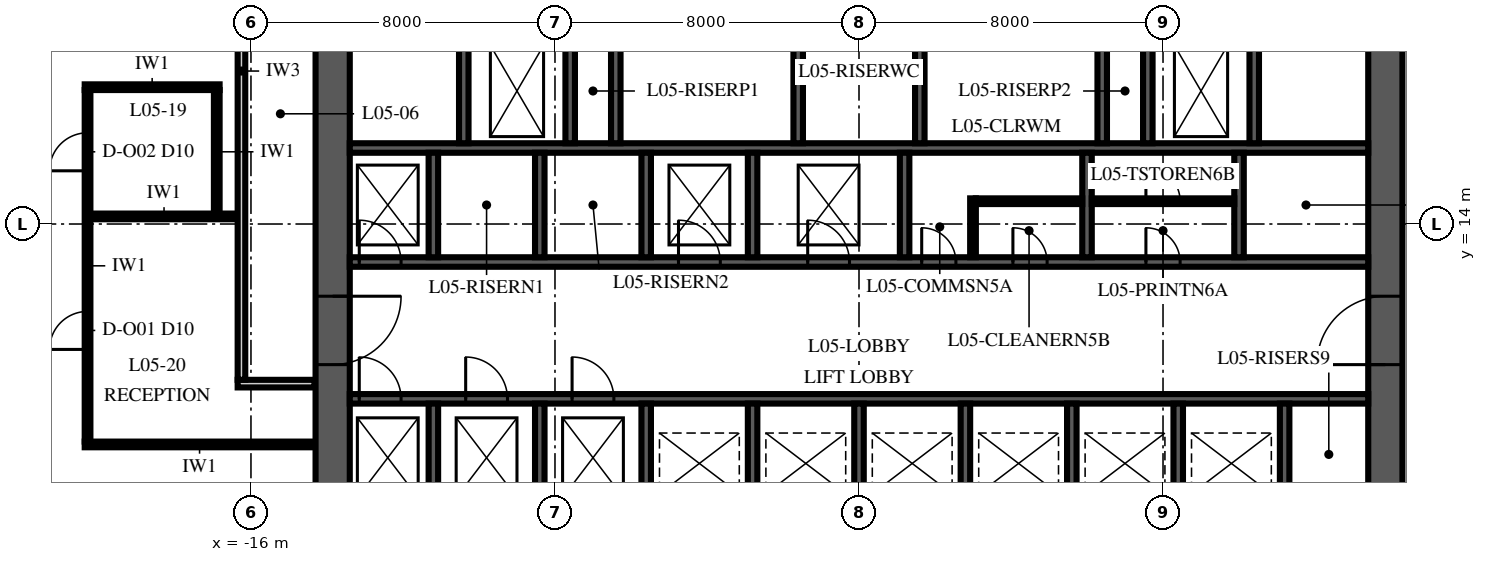
"""IFC4 building model, lengths in metres.
Left out: names, types, materials, properties, quantities, classifications, styles, units other than length and angle.
Written with IfcOpenShell. Run it as: python <this file> out.ifc"""

import sys

from ifc_helpers import new_model, si_unit, direction, frame, frame_2d, origin, place, context, subcontext, project, spatial, polyline, rectangle, outline, extrude, element, fill, save


model = new_model("IFC4")
c1 = context("Model", 3, precision=1e-05, world=origin(), true_north=direction((0.0, 1.0)))
c2 = subcontext(c1, "Body", "Model", "MODEL_VIEW")
j1 = project(units=[si_unit("LENGTHUNIT", "METRE"), si_unit("PLANEANGLEUNIT", "RADIAN")], contexts=[c1])
p1 = place(None, origin())
s1 = spatial("IfcSite", under=j1, at=p1, CompositionType="ELEMENT")
p2 = place(p1, origin())
s2 = spatial("IfcBuilding", under=s1, at=p2, CompositionType="ELEMENT")
p3 = place(p2, frame((0.0, 0.0, 32.0)))
s3 = spatial("IfcBuildingStorey", under=s2, at=p3, CompositionType="ELEMENT", Elevation=32.0)
p4 = place(p3, frame((13.85, 6.15, 0.0), z_axis=(0.0, 0.0, 1.0), x_axis=(0.0, 1.0, 0.0)))
e1 = element("IfcWall", 1, at=p4, inside=s3, PredefinedType="SHEAR", context=c2, shape_type="SweptSolid", body=[
    extrude(outline(polyline([(0.0, -0.45), (17.7, -0.45), (17.7, 0.0), (17.25, 0.0), (17.25, 0.45), (0.45, 0.45), (0.45, 0.0), (0.0, 0.0), (0.0, -0.45)])), origin(), (0.0, 0.0, 1.0), 4.0),
])
p5 = place(p4, frame((4.15, 0.0, 0.0)))
e2 = element("IfcOpeningElement", 2, at=p5, cuts=e1, PredefinedType="OPENING", context=c2, shape_type="SweptSolid", body=[
    extrude(rectangle(XDim=1.8, YDim=2.4, at=frame_2d((0.9, 1.2))), frame((0.0, 0.465, 0.0), z_axis=(0.0, -1.0, 0.0), x_axis=(1.0, 0.0, 0.0)), (0.0, 0.0, 1.0), 0.93),
])
p6 = place(p3, frame((-13.85, 23.85, 0.0), z_axis=(0.0, 0.0, 1.0), x_axis=(0.0, -1.0, 0.0)))
e3 = element("IfcWall", 3, at=p6, inside=s3, PredefinedType="SHEAR", context=c2, shape_type="SweptSolid", body=[
    extrude(outline(polyline([(0.0, -0.45), (17.7, -0.45), (17.7, 0.0), (17.25, 0.0), (17.25, 0.45), (0.45, 0.45), (0.45, 0.0), (0.0, 0.0), (0.0, -0.45)])), origin(), (0.0, 0.0, 1.0), 4.0),
])
p7 = place(p6, frame((11.75, 0.0, 0.0)))
e4 = element("IfcOpeningElement", 4, at=p7, cuts=e3, PredefinedType="OPENING", context=c2, shape_type="SweptSolid", body=[
    extrude(rectangle(XDim=1.8, YDim=2.4, at=frame_2d((0.9, 1.2))), frame((0.0, 0.465, 0.0), z_axis=(0.0, -1.0, 0.0), x_axis=(1.0, 0.0, 0.0)), (0.0, 0.0, 1.0), 0.93),
])
p8 = place(p3, frame((-13.4, 9.4, 0.0), z_axis=(0.0, 0.0, 1.0), x_axis=(1.0, 0.0, 0.0)))
e5 = element("IfcWall", 5, at=p8, inside=s3, PredefinedType="SHEAR", context=c2, shape_type="SweptSolid", body=[
    extrude(rectangle(XDim=26.8, YDim=0.25, at=frame_2d((13.4, 0.0))), origin(), (0.0, 0.0, 1.0), 4.0),
])
p9 = place(p8, frame((0.25, 0.0, 0.0)))
e6 = element("IfcOpeningElement", 6, at=p9, cuts=e5, PredefinedType="OPENING", context=c2, shape_type="SweptSolid", body=[
    extrude(rectangle(XDim=1.1, YDim=2.1, at=frame_2d((0.55, 1.05))), frame((0.0, 0.14, 0.0), z_axis=(0.0, -1.0, 0.0), x_axis=(1.0, 0.0, 0.0)), (0.0, 0.0, 1.0), 0.28),
])
p10 = place(p8, frame((3.05, 0.0, 0.0)))
e7 = element("IfcOpeningElement", 7, at=p10, cuts=e5, PredefinedType="OPENING", context=c2, shape_type="SweptSolid", body=[
    extrude(rectangle(XDim=1.1, YDim=2.1, at=frame_2d((0.55, 1.05))), frame((0.0, 0.14, 0.0), z_axis=(0.0, -1.0, 0.0), x_axis=(1.0, 0.0, 0.0)), (0.0, 0.0, 1.0), 0.28),
])
p11 = place(p8, frame((5.85, 0.0, 0.0)))
e8 = element("IfcOpeningElement", 8, at=p11, cuts=e5, PredefinedType="OPENING", context=c2, shape_type="SweptSolid", body=[
    extrude(rectangle(XDim=1.1, YDim=2.1, at=frame_2d((0.55, 1.05))), frame((0.0, 0.14, 0.0), z_axis=(0.0, -1.0, 0.0), x_axis=(1.0, 0.0, 0.0)), (0.0, 0.0, 1.0), 0.28),
])
p12 = place(p3, frame((-13.4, 13.0, 0.0), z_axis=(0.0, 0.0, 1.0), x_axis=(1.0, 0.0, 0.0)))
e9 = element("IfcWall", 9, at=p12, inside=s3, PredefinedType="SHEAR", context=c2, shape_type="SweptSolid", body=[
    extrude(rectangle(XDim=26.8, YDim=0.25, at=frame_2d((13.4, 0.0))), origin(), (0.0, 0.0, 1.0), 4.0),
])
p13 = place(p12, frame((0.25, 0.0, 0.0)))
e10 = element("IfcOpeningElement", 10, at=p13, cuts=e9, PredefinedType="OPENING", context=c2, shape_type="SweptSolid", body=[
    extrude(rectangle(XDim=1.1, YDim=2.1, at=frame_2d((0.55, 1.05))), frame((0.0, 0.14, 0.0), z_axis=(0.0, -1.0, 0.0), x_axis=(1.0, 0.0, 0.0)), (0.0, 0.0, 1.0), 0.28),
])
p14 = place(p12, frame((8.65, 0.0, 0.0)))
e11 = element("IfcOpeningElement", 11, at=p14, cuts=e9, PredefinedType="OPENING", context=c2, shape_type="SweptSolid", body=[
    extrude(rectangle(XDim=1.1, YDim=2.1, at=frame_2d((0.55, 1.05))), frame((0.0, 0.14, 0.0), z_axis=(0.0, -1.0, 0.0), x_axis=(1.0, 0.0, 0.0)), (0.0, 0.0, 1.0), 0.28),
])
p15 = place(p12, frame((12.05, 0.0, 0.0)))
e12 = element("IfcOpeningElement", 12, at=p15, cuts=e9, PredefinedType="OPENING", context=c2, shape_type="SweptSolid", body=[
    extrude(rectangle(XDim=1.1, YDim=2.1, at=frame_2d((0.55, 1.05))), frame((0.0, 0.14, 0.0), z_axis=(0.0, -1.0, 0.0), x_axis=(1.0, 0.0, 0.0)), (0.0, 0.0, 1.0), 0.28),
])
p16 = place(p12, frame((15.05, 0.0, 0.0)))
e13 = element("IfcOpeningElement", 13, at=p16, cuts=e9, PredefinedType="OPENING", context=c2, shape_type="SweptSolid", body=[
    extrude(rectangle(XDim=0.9, YDim=2.1, at=frame_2d((0.45, 1.05))), frame((0.0, 0.14, 0.0), z_axis=(0.0, -1.0, 0.0), x_axis=(1.0, 0.0, 0.0)), (0.0, 0.0, 1.0), 0.28),
])
p17 = place(p12, frame((17.45, 0.0, 0.0)))
e14 = element("IfcOpeningElement", 14, at=p17, cuts=e9, PredefinedType="OPENING", context=c2, shape_type="SweptSolid", body=[
    extrude(rectangle(XDim=0.9, YDim=2.1, at=frame_2d((0.45, 1.05))), frame((0.0, 0.14, 0.0), z_axis=(0.0, -1.0, 0.0), x_axis=(1.0, 0.0, 0.0)), (0.0, 0.0, 1.0), 0.28),
])
p18 = place(p12, frame((20.95, 0.0, 0.0)))
e15 = element("IfcOpeningElement", 15, at=p18, cuts=e9, PredefinedType="OPENING", context=c2, shape_type="SweptSolid", body=[
    extrude(rectangle(XDim=0.9, YDim=2.1, at=frame_2d((0.45, 1.05))), frame((0.0, 0.14, 0.0), z_axis=(0.0, -1.0, 0.0), x_axis=(1.0, 0.0, 0.0)), (0.0, 0.0, 1.0), 0.28),
])
p19 = place(p3, frame((-13.4, 16.0, 0.0), z_axis=(0.0, 0.0, 1.0), x_axis=(1.0, 0.0, 0.0)))
e16 = element("IfcWall", 16, at=p19, inside=s3, PredefinedType="SHEAR", context=c2, shape_type="SweptSolid", body=[
    extrude(rectangle(XDim=26.8, YDim=0.25, at=frame_2d((13.4, 0.0))), origin(), (0.0, 0.0, 1.0), 4.0),
])
for number, where, z_axis, x_axis in (
    (17, (-11.2, 6.6, 0.0), (0.0, 0.0, 1.0), (0.0, 1.0, 0.0)),
    (18, (-8.4, 6.6, 0.0), (0.0, 0.0, 1.0), (0.0, 1.0, 0.0)),
    (19, (-5.6, 6.6, 0.0), (0.0, 0.0, 1.0), (0.0, 1.0, 0.0)),
    (20, (-2.8, 6.6, 0.0), (0.0, 0.0, 1.0), (0.0, 1.0, 0.0)),
    (21, (0.0, 6.6, 0.0), (0.0, 0.0, 1.0), (0.0, 1.0, 0.0)),
    (22, (2.8, 6.6, 0.0), (0.0, 0.0, 1.0), (0.0, 1.0, 0.0)),
    (23, (5.6, 6.6, 0.0), (0.0, 0.0, 1.0), (0.0, 1.0, 0.0)),
    (24, (8.4, 6.6, 0.0), (0.0, 0.0, 1.0), (0.0, 1.0, 0.0)),
    (25, (11.2, 6.6, 0.0), (0.0, 0.0, 1.0), (0.0, 1.0, 0.0)),
):
    element("IfcWall", number, at=place(p3, frame(where, z_axis=z_axis, x_axis=x_axis)), inside=s3, PredefinedType="SHEAR", context=c2, shape_type="SweptSolid", body=[
        extrude(rectangle(XDim=2.675, YDim=0.25, at=frame_2d((1.337, 0.0))), origin(), (0.0, 0.0, 1.0), 4.0),
    ])
for number, where, z_axis, x_axis in (
    (26, (-11.2, 13.125, 0.0), (0.0, 0.0, 1.0), (0.0, 1.0, 0.0)),
    (27, (-8.4, 13.125, 0.0), (0.0, 0.0, 1.0), (0.0, 1.0, 0.0)),
    (28, (-5.6, 13.125, 0.0), (0.0, 0.0, 1.0), (0.0, 1.0, 0.0)),
    (29, (-2.8, 13.125, 0.0), (0.0, 0.0, 1.0), (0.0, 1.0, 0.0)),
    (30, (1.2, 13.125, 0.0), (0.0, 0.0, 1.0), (0.0, 1.0, 0.0)),
    (31, (6.0, 13.125, 0.0), (0.0, 0.0, 1.0), (0.0, 1.0, 0.0)),
    (32, (10.0, 13.125, 0.0), (0.0, 0.0, 1.0), (0.0, 1.0, 0.0)),
):
    element("IfcWall", number, at=place(p3, frame(where, z_axis=z_axis, x_axis=x_axis)), inside=s3, PredefinedType="SHEAR", context=c2, shape_type="SweptSolid", body=[
        extrude(rectangle(XDim=2.75, YDim=0.25, at=frame_2d((1.375, 0.0))), origin(), (0.0, 0.0, 1.0), 4.0),
    ])
p20 = place(p3, frame((-10.4, 16.125, 0.0), z_axis=(0.0, 0.0, 1.0), x_axis=(0.0, 1.0, 0.0)))
e33 = element("IfcWall", 33, at=p20, inside=s3, PredefinedType="SHEAR", context=c2, shape_type="SweptSolid", body=[
    extrude(rectangle(XDim=7.275, YDim=0.25, at=frame_2d((3.637, 0.0))), origin(), (0.0, 0.0, 1.0), 4.0),
])
p21 = place(p20, frame((6.075, 0.0, 0.0)))
e34 = element("IfcOpeningElement", 34, at=p21, cuts=e33, PredefinedType="OPENING", context=c2, shape_type="SweptSolid", body=[
    extrude(rectangle(XDim=1.0, YDim=2.1, at=frame_2d((0.5, 1.05))), frame((0.0, 0.14, 0.0), z_axis=(0.0, -1.0, 0.0), x_axis=(1.0, 0.0, 0.0)), (0.0, 0.0, 1.0), 0.28),
])
for number, where, z_axis, x_axis in (
    (35, (-6.4, 16.125, 0.0), (0.0, 0.0, 1.0), (0.0, 1.0, 0.0)),
    (36, (-1.6, 16.125, 0.0), (0.0, 0.0, 1.0), (0.0, 1.0, 0.0)),
    (37, (1.6, 16.125, 0.0), (0.0, 0.0, 1.0), (0.0, 1.0, 0.0)),
    (38, (6.4, 16.125, 0.0), (0.0, 0.0, 1.0), (0.0, 1.0, 0.0)),
):
    element("IfcWall", number, at=place(p3, frame(where, z_axis=z_axis, x_axis=x_axis)), inside=s3, PredefinedType="SHEAR", context=c2, shape_type="SweptSolid", body=[
        extrude(rectangle(XDim=7.275, YDim=0.25, at=frame_2d((3.637, 0.0))), origin(), (0.0, 0.0, 1.0), 4.0),
    ])
p22 = place(p3, frame((10.4, 16.125, 0.0), z_axis=(0.0, 0.0, 1.0), x_axis=(0.0, 1.0, 0.0)))
e39 = element("IfcWall", 39, at=p22, inside=s3, PredefinedType="SHEAR", context=c2, shape_type="SweptSolid", body=[
    extrude(rectangle(XDim=7.275, YDim=0.25, at=frame_2d((3.637, 0.0))), origin(), (0.0, 0.0, 1.0), 4.0),
])
p23 = place(p22, frame((6.075, 0.0, 0.0)))
e40 = element("IfcOpeningElement", 40, at=p23, cuts=e39, PredefinedType="OPENING", context=c2, shape_type="SweptSolid", body=[
    extrude(rectangle(XDim=1.0, YDim=2.1, at=frame_2d((0.5, 1.05))), frame((0.0, 0.14, 0.0), z_axis=(0.0, -1.0, 0.0), x_axis=(1.0, 0.0, 0.0)), (0.0, 0.0, 1.0), 0.28),
])
for number, where, z_axis, x_axis in (
    (41, (-7.6, 16.125, 0.0), (0.0, 0.0, 1.0), (0.0, 1.0, 0.0)),
    (42, (7.6, 16.125, 0.0), (0.0, 0.0, 1.0), (0.0, 1.0, 0.0)),
):
    element("IfcWall", number, at=place(p3, frame(where, z_axis=z_axis, x_axis=x_axis)), inside=s3, PredefinedType="SHEAR", context=c2, shape_type="SweptSolid", body=[
        extrude(rectangle(XDim=2.75, YDim=0.25, at=frame_2d((1.375, 0.0))), origin(), (0.0, 0.0, 1.0), 4.0),
    ])
p24 = place(p3, frame((3.0, 13.125, 0.0), z_axis=(0.0, 0.0, 1.0), x_axis=(0.0, 1.0, 0.0)))
e43 = element("IfcWall", 43, at=p24, inside=s3, PredefinedType="PARTITIONING", context=c2, shape_type="SweptSolid", body=[
    extrude(rectangle(XDim=1.55, YDim=0.15, at=frame_2d((0.775, 0.0))), origin(), (0.0, 0.0, 1.0), 3.85),
])
p25 = place(p3, frame((3.075, 14.6, 0.0), z_axis=(0.0, 0.0, 1.0), x_axis=(1.0, 0.0, 0.0)))
e44 = element("IfcWall", 44, at=p25, inside=s3, PredefinedType="PARTITIONING", context=c2, shape_type="SweptSolid", body=[
    extrude(rectangle(XDim=2.8, YDim=0.15, at=frame_2d((1.4, 0.0))), origin(), (0.0, 0.0, 1.0), 3.85),
])
p26 = place(p3, frame((6.125, 14.6, 0.0), z_axis=(0.0, 0.0, 1.0), x_axis=(1.0, 0.0, 0.0)))
e45 = element("IfcWall", 45, at=p26, inside=s3, PredefinedType="PARTITIONING", context=c2, shape_type="SweptSolid", body=[
    extrude(rectangle(XDim=3.75, YDim=0.15, at=frame_2d((1.875, 0.0))), origin(), (0.0, 0.0, 1.0), 3.85),
])
p27 = place(p26, frame((1.425, 0.0, 0.0)))
e46 = element("IfcOpeningElement", 46, at=p27, cuts=e45, PredefinedType="OPENING", context=c2, shape_type="SweptSolid", body=[
    extrude(rectangle(XDim=0.9, YDim=2.1, at=frame_2d((0.45, 1.05))), frame((0.0, 0.09, 0.0), z_axis=(0.0, -1.0, 0.0), x_axis=(1.0, 0.0, 0.0)), (0.0, 0.0, 1.0), 0.18),
])
p28 = place(p3, frame((-20.375, 8.2, 0.0), z_axis=(0.0, 0.0, 1.0), x_axis=(1.0, 0.0, 0.0)))
e47 = element("IfcWall", 47, at=p28, inside=s3, PredefinedType="PARTITIONING", context=c2, shape_type="SweptSolid", body=[
    extrude(rectangle(XDim=6.045, YDim=0.15, at=frame_2d((3.022, 0.0))), origin(), (0.0, 0.0, 1.0), 3.85),
])
p29 = place(p3, frame((-16.35, 9.8, 0.0), z_axis=(0.0, 0.0, 1.0), x_axis=(1.0, 0.0, 0.0)))
e48 = element("IfcWall", 48, at=p29, inside=s3, PredefinedType="PARTITIONING", context=c2, shape_type="SweptSolid", body=[
    extrude(rectangle(XDim=2.02, YDim=0.2, at=frame_2d((1.01, 0.0))), origin(), (0.0, 0.0, 1.0), 3.85),
])
p30 = place(p3, frame((-20.225, 14.2, 0.0), z_axis=(0.0, 0.0, 1.0), x_axis=(1.0, 0.0, 0.0)))
e49 = element("IfcWall", 49, at=p30, inside=s3, PredefinedType="PARTITIONING", context=c2, shape_type="SweptSolid", body=[
    extrude(rectangle(XDim=3.875, YDim=0.15, at=frame_2d((1.938, 0.0))), origin(), (0.0, 0.0, 1.0), 3.25),
])
p31 = place(p3, frame((-20.375, 17.6, 0.0), z_axis=(0.0, 0.0, 1.0), x_axis=(1.0, 0.0, 0.0)))
e50 = element("IfcWall", 50, at=p31, inside=s3, PredefinedType="PARTITIONING", context=c2, shape_type="SweptSolid", body=[
    extrude(rectangle(XDim=3.55, YDim=0.15, at=frame_2d((1.775, 0.0))), origin(), (0.0, 0.0, 1.0), 3.85),
])
p32 = place(p3, frame((-20.3, 8.275, 0.0), z_axis=(0.0, 0.0, 1.0), x_axis=(0.0, 1.0, 0.0)))
e51 = element("IfcWall", 51, at=p32, inside=s3, PredefinedType="PARTITIONING", context=c2, shape_type="SweptSolid", body=[
    extrude(rectangle(XDim=9.25, YDim=0.15, at=frame_2d((4.625, 0.0))), origin(), (0.0, 0.0, 1.0), 3.25),
])
p33 = place(p32, frame((2.425, 0.0, 0.0)))
e52 = element("IfcOpeningElement", 52, at=p33, cuts=e51, PredefinedType="OPENING", context=c2, shape_type="SweptSolid", body=[
    extrude(rectangle(XDim=1.0, YDim=2.3, at=frame_2d((0.5, 1.15))), frame((0.0, 0.09, 0.0), z_axis=(0.0, -1.0, 0.0), x_axis=(1.0, 0.0, 0.0)), (0.0, 0.0, 1.0), 0.18),
])
p34 = place(p32, frame((7.125, 0.0, 0.0)))
e53 = element("IfcOpeningElement", 53, at=p34, cuts=e51, PredefinedType="OPENING", context=c2, shape_type="SweptSolid", body=[
    extrude(rectangle(XDim=1.0, YDim=2.3, at=frame_2d((0.5, 1.15))), frame((0.0, 0.09, 0.0), z_axis=(0.0, -1.0, 0.0), x_axis=(1.0, 0.0, 0.0)), (0.0, 0.0, 1.0), 0.18),
])
p35 = place(p3, frame((-16.9, 14.275, 0.0), z_axis=(0.0, 0.0, 1.0), x_axis=(0.0, 1.0, 0.0)))
e54 = element("IfcWall", 54, at=p35, inside=s3, PredefinedType="PARTITIONING", context=c2, shape_type="SweptSolid", body=[
    extrude(rectangle(XDim=3.25, YDim=0.15, at=frame_2d((1.625, 0.0))), origin(), (0.0, 0.0, 1.0), 3.25),
])
p36 = place(p3, frame((-16.25, 9.9, 0.0), z_axis=(0.0, 0.0, 1.0), x_axis=(0.0, 1.0, 0.0)))
e55 = element("IfcWall", 55, at=p36, inside=s3, PredefinedType="PARTITIONING", context=c2, shape_type="SweptSolid", body=[
    extrude(rectangle(XDim=16.25, YDim=0.2, at=frame_2d((8.125, 0.0))), origin(), (0.0, 0.0, 1.0), 3.25),
])
p37 = place(p36, frame((14.75, 0.0, 0.0)))
e56 = element("IfcOpeningElement", 56, at=p37, cuts=e55, PredefinedType="OPENING", context=c2, shape_type="SweptSolid", body=[
    extrude(rectangle(XDim=1.2, YDim=2.4, at=frame_2d((0.6, 1.2))), frame((0.0, 0.115, 0.0), z_axis=(0.0, -1.0, 0.0), x_axis=(1.0, 0.0, 0.0)), (0.0, 0.0, 1.0), 0.23),
])
p38 = place(p5, origin())
e57 = element("IfcDoor", 57, at=p38, inside=s3, OperationType="DOUBLE_DOOR_SINGLE_SWING", PredefinedType="DOOR", context=c2, shape_type="SweptSolid", body=[
    extrude(rectangle(XDim=1.8, YDim=2.4, at=frame_2d((0.9, 1.2))), frame((0.0, 0.45, 0.0), z_axis=(0.0, -1.0, 0.0), x_axis=(1.0, 0.0, 0.0)), (0.0, 0.0, 1.0), 0.899),
])
fill(e2, e57)
p39 = place(p7, origin())
e58 = element("IfcDoor", 58, at=p39, inside=s3, OperationType="DOUBLE_DOOR_SINGLE_SWING", PredefinedType="DOOR", context=c2, shape_type="SweptSolid", body=[
    extrude(rectangle(XDim=1.8, YDim=2.4, at=frame_2d((0.9, 1.2))), frame((0.0, 0.45, 0.0), z_axis=(0.0, -1.0, 0.0), x_axis=(1.0, 0.0, 0.0)), (0.0, 0.0, 1.0), 0.899),
])
fill(e4, e58)
p40 = place(p9, origin())
e59 = element("IfcDoor", 59, at=p40, inside=s3, OperationType="SLIDING_TO_LEFT", PredefinedType="DOOR", context=c2, shape_type="SweptSolid", body=[
    extrude(rectangle(XDim=1.1, YDim=2.1, at=frame_2d((0.55, 1.05))), frame((0.0, 0.125, 0.0), z_axis=(0.0, -1.0, 0.0), x_axis=(1.0, 0.0, 0.0)), (0.0, 0.0, 1.0), 0.25),
])
fill(e6, e59)
p41 = place(p10, origin())
e60 = element("IfcDoor", 60, at=p41, inside=s3, OperationType="SLIDING_TO_LEFT", PredefinedType="DOOR", context=c2, shape_type="SweptSolid", body=[
    extrude(rectangle(XDim=1.1, YDim=2.1, at=frame_2d((0.55, 1.05))), frame((0.0, 0.125, 0.0), z_axis=(0.0, -1.0, 0.0), x_axis=(1.0, 0.0, 0.0)), (0.0, 0.0, 1.0), 0.25),
])
fill(e7, e60)
p42 = place(p11, origin())
e61 = element("IfcDoor", 61, at=p42, inside=s3, OperationType="SLIDING_TO_LEFT", PredefinedType="DOOR", context=c2, shape_type="SweptSolid", body=[
    extrude(rectangle(XDim=1.1, YDim=2.1, at=frame_2d((0.55, 1.05))), frame((0.0, 0.125, 0.0), z_axis=(0.0, -1.0, 0.0), x_axis=(1.0, 0.0, 0.0)), (0.0, 0.0, 1.0), 0.25),
])
fill(e8, e61)
p43 = place(p13, origin())
e62 = element("IfcDoor", 62, at=p43, inside=s3, OperationType="SLIDING_TO_LEFT", PredefinedType="DOOR", context=c2, shape_type="SweptSolid", body=[
    extrude(rectangle(XDim=1.1, YDim=2.1, at=frame_2d((0.55, 1.05))), frame((0.0, 0.125, 0.0), z_axis=(0.0, -1.0, 0.0), x_axis=(1.0, 0.0, 0.0)), (0.0, 0.0, 1.0), 0.25),
])
fill(e10, e62)
p44 = place(p14, origin())
e63 = element("IfcDoor", 63, at=p44, inside=s3, OperationType="SLIDING_TO_LEFT", PredefinedType="DOOR", context=c2, shape_type="SweptSolid", body=[
    extrude(rectangle(XDim=1.1, YDim=2.1, at=frame_2d((0.55, 1.05))), frame((0.0, 0.125, 0.0), z_axis=(0.0, -1.0, 0.0), x_axis=(1.0, 0.0, 0.0)), (0.0, 0.0, 1.0), 0.25),
])
fill(e11, e63)
p45 = place(p15, origin())
e64 = element("IfcDoor", 64, at=p45, inside=s3, OperationType="SLIDING_TO_LEFT", PredefinedType="DOOR", context=c2, shape_type="SweptSolid", body=[
    extrude(rectangle(XDim=1.1, YDim=2.1, at=frame_2d((0.55, 1.05))), frame((0.0, 0.125, 0.0), z_axis=(0.0, -1.0, 0.0), x_axis=(1.0, 0.0, 0.0)), (0.0, 0.0, 1.0), 0.25),
])
fill(e12, e64)
p46 = place(p16, origin())
e65 = element("IfcDoor", 65, at=p46, inside=s3, OperationType="SINGLE_SWING_LEFT", PredefinedType="DOOR", context=c2, shape_type="SweptSolid", body=[
    extrude(rectangle(XDim=0.9, YDim=2.1, at=frame_2d((0.45, 1.05))), frame((0.0, 0.125, 0.0), z_axis=(0.0, -1.0, 0.0), x_axis=(1.0, 0.0, 0.0)), (0.0, 0.0, 1.0), 0.25),
])
fill(e13, e65)
p47 = place(p17, origin())
e66 = element("IfcDoor", 66, at=p47, inside=s3, OperationType="SINGLE_SWING_LEFT", PredefinedType="DOOR", context=c2, shape_type="SweptSolid", body=[
    extrude(rectangle(XDim=0.9, YDim=2.1, at=frame_2d((0.45, 1.05))), frame((0.0, 0.125, 0.0), z_axis=(0.0, -1.0, 0.0), x_axis=(1.0, 0.0, 0.0)), (0.0, 0.0, 1.0), 0.25),
])
fill(e14, e66)
p48 = place(p18, origin())
e67 = element("IfcDoor", 67, at=p48, inside=s3, OperationType="SINGLE_SWING_LEFT", PredefinedType="DOOR", context=c2, shape_type="SweptSolid", body=[
    extrude(rectangle(XDim=0.9, YDim=2.1, at=frame_2d((0.45, 1.05))), frame((0.0, 0.125, 0.0), z_axis=(0.0, -1.0, 0.0), x_axis=(1.0, 0.0, 0.0)), (0.0, 0.0, 1.0), 0.25),
])
fill(e15, e67)
p49 = place(p27, origin())
e68 = element("IfcDoor", 68, at=p49, inside=s3, OperationType="SINGLE_SWING_LEFT", PredefinedType="DOOR", context=c2, shape_type="SweptSolid", body=[
    extrude(rectangle(XDim=0.9, YDim=2.1, at=frame_2d((0.45, 1.05))), frame((0.0, 0.075, 0.0), z_axis=(0.0, -1.0, 0.0), x_axis=(1.0, 0.0, 0.0)), (0.0, 0.0, 1.0), 0.149),
])
fill(e46, e68)
p50 = place(p33, origin())
e69 = element("IfcDoor", 69, at=p50, inside=s3, OperationType="SINGLE_SWING_LEFT", PredefinedType="DOOR", context=c2, shape_type="SweptSolid", body=[
    extrude(rectangle(XDim=1.0, YDim=2.3, at=frame_2d((0.5, 1.15))), frame((0.0, 0.075, 0.0), z_axis=(0.0, -1.0, 0.0), x_axis=(1.0, 0.0, 0.0)), (0.0, 0.0, 1.0), 0.149),
])
fill(e52, e69)
p51 = place(p34, origin())
e70 = element("IfcDoor", 70, at=p51, inside=s3, OperationType="SINGLE_SWING_LEFT", PredefinedType="DOOR", context=c2, shape_type="SweptSolid", body=[
    extrude(rectangle(XDim=1.0, YDim=2.3, at=frame_2d((0.5, 1.15))), frame((0.0, 0.075, 0.0), z_axis=(0.0, -1.0, 0.0), x_axis=(1.0, 0.0, 0.0)), (0.0, 0.0, 1.0), 0.149),
])
fill(e53, e70)
save(model, sys.argv[1])
